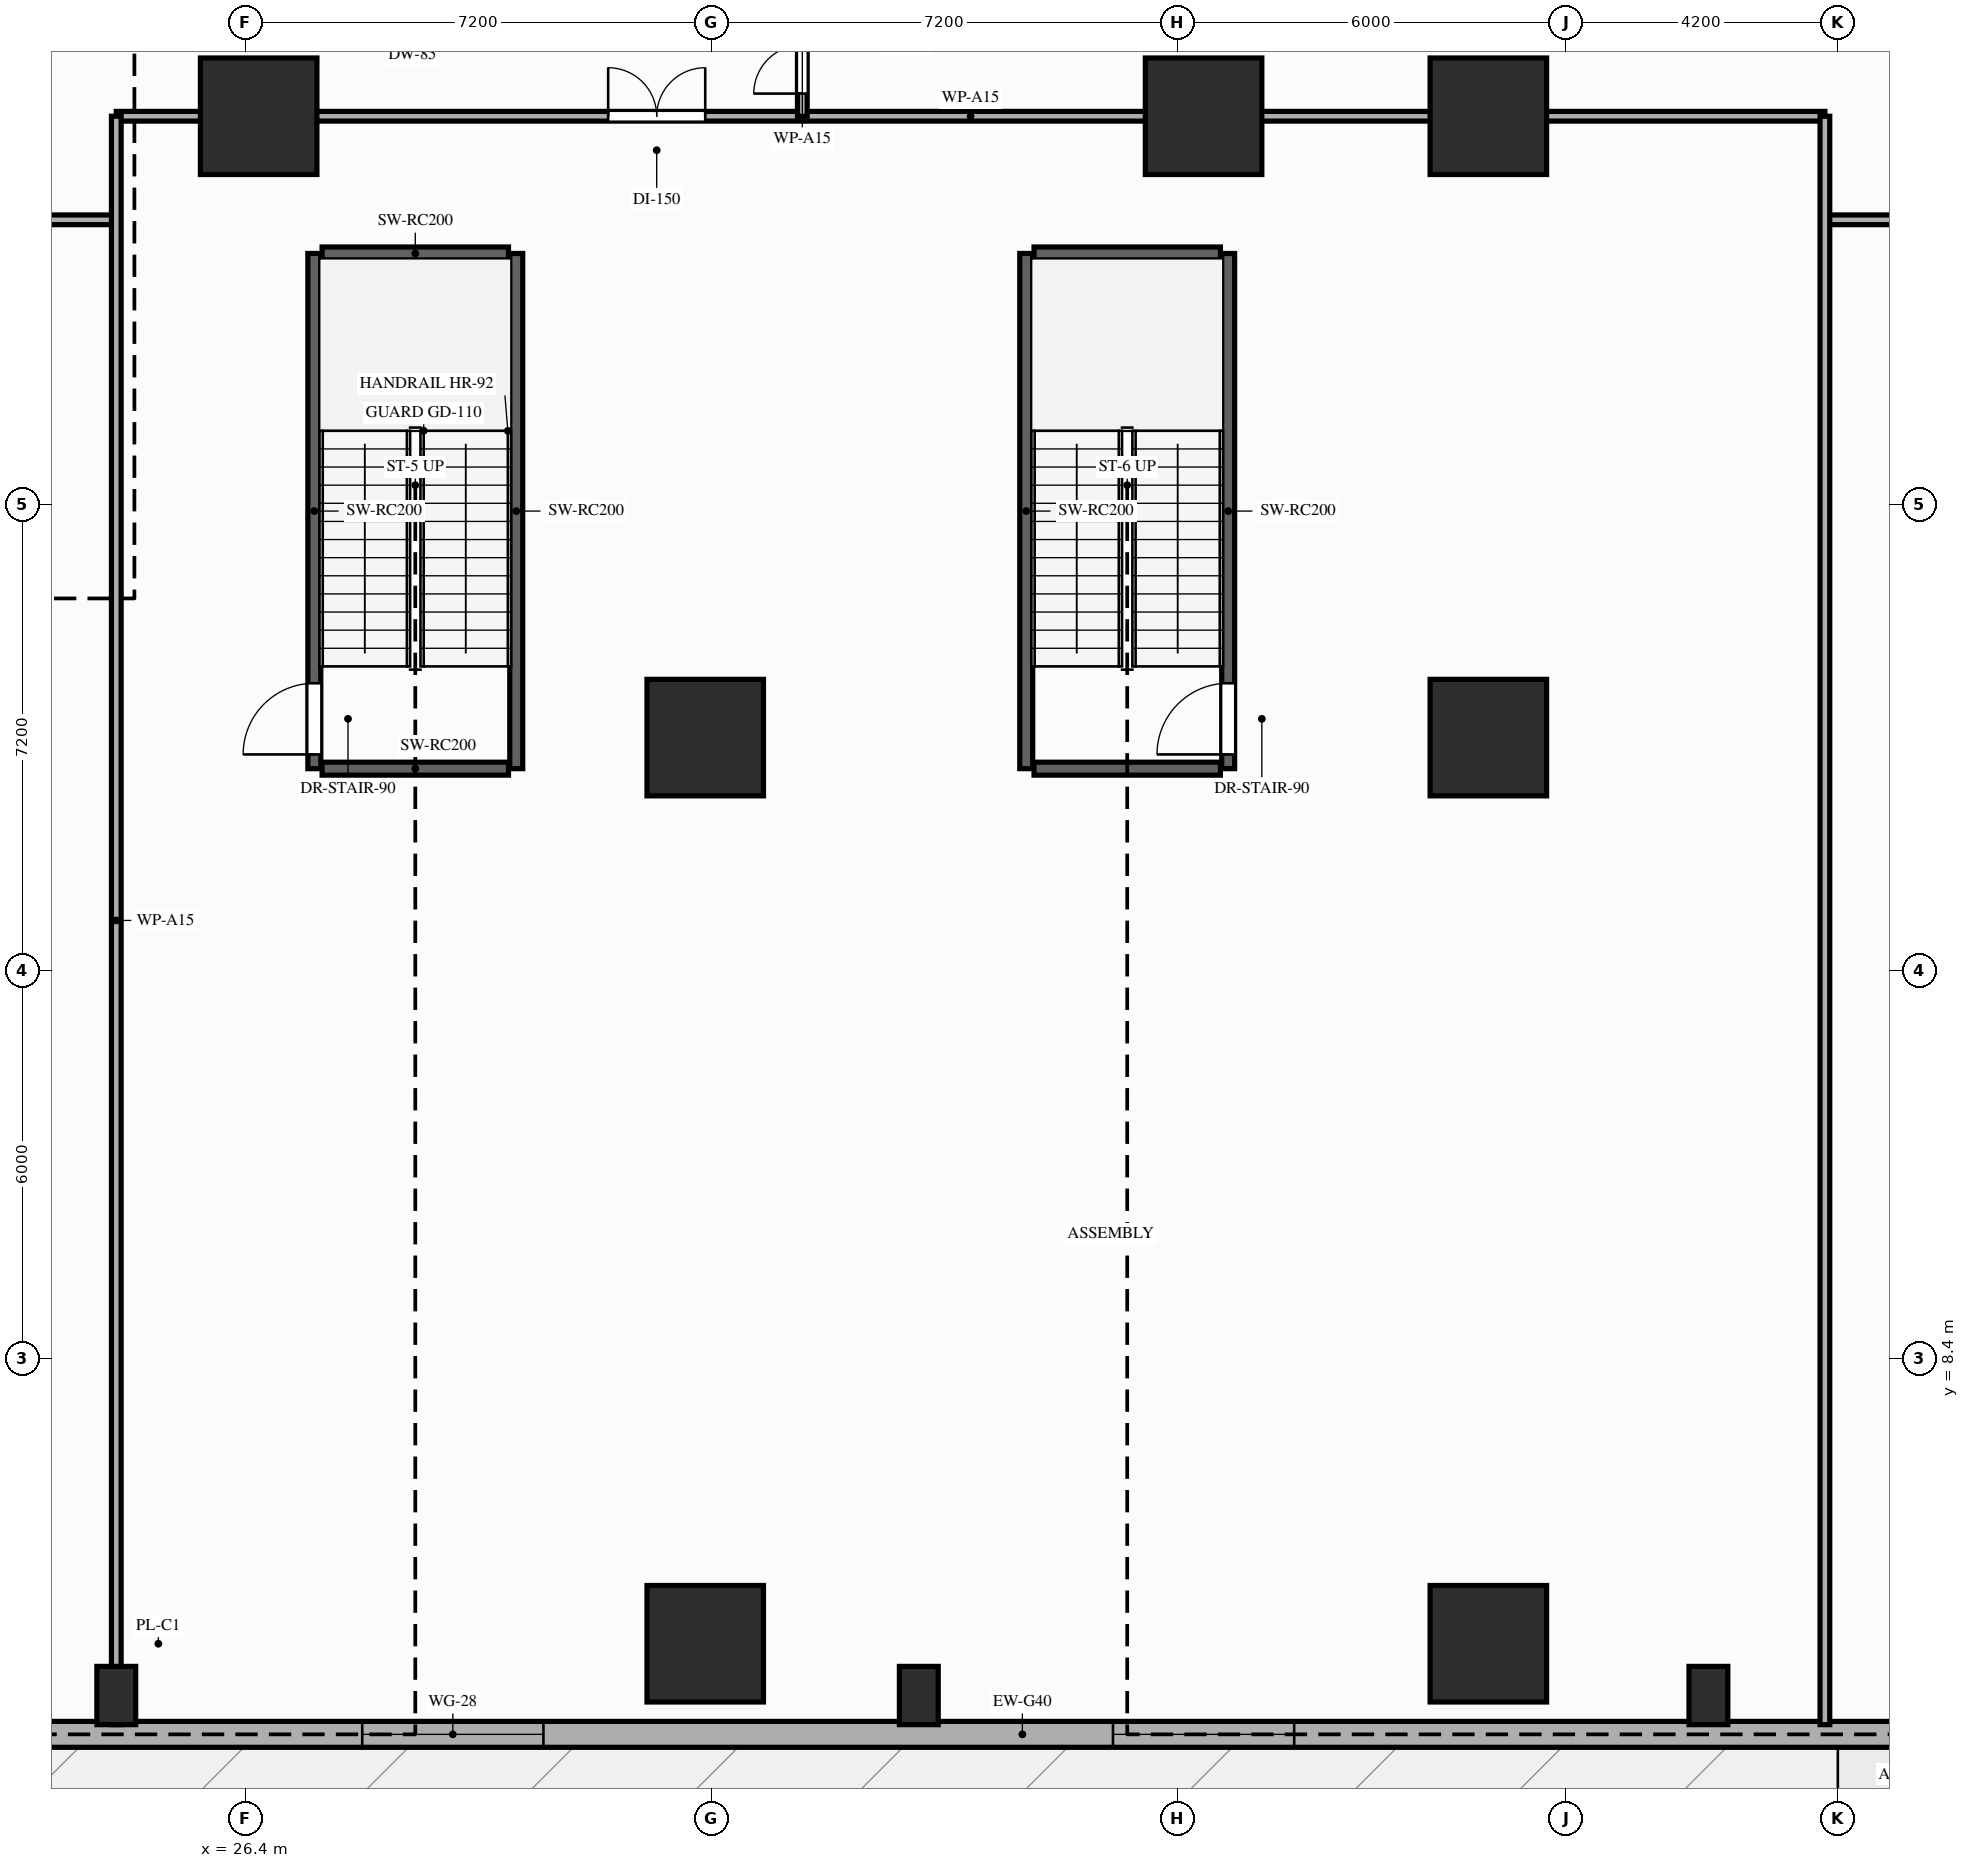
"""IFC4 building model, lengths in metres.
Left out: names, types, materials, properties, quantities, classifications, styles, units other than length and angle.
Written with IfcOpenShell. Run it as: python <this file> out.ifc"""

import sys

from ifc_helpers import new_model, si_unit, direction, frame, frame_2d, origin, origin_2d, place, context, subcontext, project, spatial, rectangle, extrude, element, fill, save


model = new_model("IFC4")
c1 = context("Model", 3, precision=1e-05, world=origin(), true_north=direction((0.0, 1.0)))
c2 = subcontext(c1, "Body", "Model", "MODEL_VIEW")
j1 = project(units=[si_unit("LENGTHUNIT", "METRE"), si_unit("PLANEANGLEUNIT", "RADIAN")], contexts=[c1])
p1 = place(None, origin())
s1 = spatial("IfcSite", under=j1, at=p1, CompositionType="ELEMENT")
p2 = place(p1, origin())
s2 = spatial("IfcBuilding", under=s1, at=p2, CompositionType="ELEMENT")
p3 = place(p2, origin())
s3 = spatial("IfcBuildingStorey", under=s2, at=p3, CompositionType="ELEMENT", Elevation=0.0)
for number, where, z_axis, x_axis in (
    (1, (26.6, 27.6, 0.0), (0.0, 0.0, 1.0), (1.0, 0.0, 0.0)),
    (2, (41.2, 27.6, 0.0), (0.0, 0.0, 1.0), (1.0, 0.0, 0.0)),
    (3, (45.6, 27.6, 0.0), (0.0, 0.0, 1.0), (1.0, 0.0, 0.0)),
    (4, (33.5, 4.0, 0.0), (0.0, 0.0, 1.0), (1.0, 0.0, 0.0)),
    (5, (45.6, 4.0, 0.0), (0.0, 0.0, 1.0), (1.0, 0.0, 0.0)),
    (6, (33.5, 18.0, 0.0), (0.0, 0.0, 1.0), (1.0, 0.0, 0.0)),
    (7, (45.6, 18.0, 0.0), (0.0, 0.0, 1.0), (1.0, 0.0, 0.0)),
):
    element("IfcColumn", number, at=place(p3, frame(where, z_axis=z_axis, x_axis=x_axis)), inside=s3, PredefinedType="COLUMN", context=c2, shape_type="SweptSolid", body=[
        extrude(rectangle(XDim=1.8, YDim=1.8, at=origin_2d()), origin(), (0.0, 0.0, 1.0), 4.6),
    ])
for number, where, z_axis, x_axis in (
    (8, (24.4, 3.2, 0.0), (0.0, 0.0, 1.0), (1.0, 0.0, 0.0)),
    (9, (36.8, 3.2, 0.0), (0.0, 0.0, 1.0), (1.0, 0.0, 0.0)),
    (10, (49.0, 3.2, 0.0), (0.0, 0.0, 1.0), (1.0, 0.0, 0.0)),
):
    element("IfcColumn", number, at=place(p3, frame(where, z_axis=z_axis, x_axis=x_axis)), inside=s3, PredefinedType="PILASTER", context=c2, shape_type="SweptSolid", body=[
        extrude(rectangle(XDim=0.6, YDim=0.9, at=origin_2d()), origin(), (0.0, 0.0, 1.0), 4.6),
    ])
p4 = place(p3, frame((3.6, 2.6, 0.0), z_axis=(0.0, 0.0, 1.0), x_axis=(1.0, 0.0, 0.0)))
e11 = element("IfcWall", 11, at=p4, inside=s3, PredefinedType="STANDARD", context=c2, shape_type="SweptSolid", body=[
    extrude(rectangle(XDim=69.6, YDim=0.4, at=frame_2d((34.8, 0.0))), origin(), (0.0, 0.0, 1.0), 4.35),
])
p5 = place(p4, frame((24.6, 0.0, 0.9)))
e12 = element("IfcOpeningElement", 12, at=p5, cuts=e11, PredefinedType="OPENING", context=c2, shape_type="SweptSolid", body=[
    extrude(rectangle(XDim=2.8, YDim=2.2, at=frame_2d((1.4, 1.1))), frame((0.0, 0.21, 0.0), z_axis=(0.0, -1.0, 0.0), x_axis=(1.0, 0.0, 0.0)), (0.0, 0.0, 1.0), 0.42),
])
p6 = place(p4, frame((36.2, 0.0, 0.9)))
e13 = element("IfcOpeningElement", 13, at=p6, cuts=e11, PredefinedType="OPENING", context=c2, shape_type="SweptSolid", body=[
    extrude(rectangle(XDim=2.8, YDim=2.2, at=frame_2d((1.4, 1.1))), frame((0.0, 0.21, 0.0), z_axis=(0.0, -1.0, 0.0), x_axis=(1.0, 0.0, 0.0)), (0.0, 0.0, 1.0), 0.42),
])
p7 = place(p4, frame((64.0, 0.0, 0.9)))
e14 = element("IfcOpeningElement", 14, at=p7, cuts=e11, PredefinedType="OPENING", context=c2, shape_type="SweptSolid", body=[
    extrude(rectangle(XDim=2.8, YDim=2.2, at=frame_2d((1.4, 1.1))), frame((0.0, 0.21, 0.0), z_axis=(0.0, -1.0, 0.0), x_axis=(1.0, 0.0, 0.0)), (0.0, 0.0, 1.0), 0.42),
])
p8 = place(p4, frame((17.2, 0.0, 0.0)))
e15 = element("IfcOpeningElement", 15, at=p8, cuts=e11, PredefinedType="OPENING", context=c2, shape_type="SweptSolid", body=[
    extrude(rectangle(XDim=2.2, YDim=2.45, at=frame_2d((1.1, 1.225))), frame((0.0, 0.21, 0.0), z_axis=(0.0, -1.0, 0.0), x_axis=(1.0, 0.0, 0.0)), (0.0, 0.0, 1.0), 0.42),
])
p9 = place(p4, frame((48.4, 0.0, 0.0)))
e16 = element("IfcOpeningElement", 16, at=p9, cuts=e11, PredefinedType="OPENING", context=c2, shape_type="SweptSolid", body=[
    extrude(rectangle(XDim=2.0, YDim=2.4, at=frame_2d((1.0, 1.2))), frame((0.0, 0.21, 0.0), z_axis=(0.0, -1.0, 0.0), x_axis=(1.0, 0.0, 0.0)), (0.0, 0.0, 1.0), 0.42),
])
p10 = place(p3, frame((27.46, 17.52, 0.0), z_axis=(0.0, 0.0, 1.0), x_axis=(0.0, 1.0, 0.0)))
e17 = element("IfcWall", 17, at=p10, inside=s3, PredefinedType="SHEAR", context=c2, shape_type="SweptSolid", body=[
    extrude(rectangle(XDim=7.96, YDim=0.2, at=frame_2d((3.98, 0.0))), origin(), (0.0, 0.0, 1.0), 4.35),
])
p11 = place(p10, frame((0.22, 0.0, 0.0)))
e18 = element("IfcOpeningElement", 18, at=p11, cuts=e17, PredefinedType="OPENING", context=c2, shape_type="SweptSolid", body=[
    extrude(rectangle(XDim=1.1, YDim=2.15, at=frame_2d((0.55, 1.075))), frame((0.0, 0.11, 0.0), z_axis=(0.0, -1.0, 0.0), x_axis=(1.0, 0.0, 0.0)), (0.0, 0.0, 1.0), 0.22),
])
p12 = place(p3, frame((30.58, 17.52, 0.0), z_axis=(0.0, 0.0, 1.0), x_axis=(0.0, 1.0, 0.0)))
e19 = element("IfcWall", 19, at=p12, inside=s3, PredefinedType="SHEAR", context=c2, shape_type="SweptSolid", body=[
    extrude(rectangle(XDim=7.96, YDim=0.2, at=frame_2d((3.98, 0.0))), origin(), (0.0, 0.0, 1.0), 4.35),
])
for number, where, z_axis, x_axis in (
    (20, (27.58, 25.48, 0.0), (0.0, 0.0, 1.0), (1.0, 0.0, 0.0)),
    (21, (27.58, 17.52, 0.0), (0.0, 0.0, 1.0), (1.0, 0.0, 0.0)),
):
    element("IfcWall", number, at=place(p3, frame(where, z_axis=z_axis, x_axis=x_axis)), inside=s3, PredefinedType="SHEAR", context=c2, shape_type="SweptSolid", body=[
        extrude(rectangle(XDim=2.88, YDim=0.2, at=frame_2d((1.44, 0.0))), origin(), (0.0, 0.0, 1.0), 4.35),
    ])
p13 = place(p3, frame((38.46, 17.52, 0.0), z_axis=(0.0, 0.0, 1.0), x_axis=(0.0, 1.0, 0.0)))
e22 = element("IfcWall", 22, at=p13, inside=s3, PredefinedType="SHEAR", context=c2, shape_type="SweptSolid", body=[
    extrude(rectangle(XDim=7.96, YDim=0.2, at=frame_2d((3.98, 0.0))), origin(), (0.0, 0.0, 1.0), 4.35),
])
p14 = place(p3, frame((41.58, 17.52, 0.0), z_axis=(0.0, 0.0, 1.0), x_axis=(0.0, 1.0, 0.0)))
e23 = element("IfcWall", 23, at=p14, inside=s3, PredefinedType="SHEAR", context=c2, shape_type="SweptSolid", body=[
    extrude(rectangle(XDim=7.96, YDim=0.2, at=frame_2d((3.98, 0.0))), origin(), (0.0, 0.0, 1.0), 4.35),
])
p15 = place(p14, frame((0.22, 0.0, 0.0)))
e24 = element("IfcOpeningElement", 24, at=p15, cuts=e23, PredefinedType="OPENING", context=c2, shape_type="SweptSolid", body=[
    extrude(rectangle(XDim=1.1, YDim=2.15, at=frame_2d((0.55, 1.075))), frame((0.0, 0.11, 0.0), z_axis=(0.0, -1.0, 0.0), x_axis=(1.0, 0.0, 0.0)), (0.0, 0.0, 1.0), 0.22),
])
for number, where, z_axis, x_axis in (
    (25, (38.58, 25.48, 0.0), (0.0, 0.0, 1.0), (1.0, 0.0, 0.0)),
    (26, (38.58, 17.52, 0.0), (0.0, 0.0, 1.0), (1.0, 0.0, 0.0)),
):
    element("IfcWall", number, at=place(p3, frame(where, z_axis=z_axis, x_axis=x_axis)), inside=s3, PredefinedType="SHEAR", context=c2, shape_type="SweptSolid", body=[
        extrude(rectangle(XDim=2.88, YDim=0.2, at=frame_2d((1.44, 0.0))), origin(), (0.0, 0.0, 1.0), 4.35),
    ])
p16 = place(p3, frame((9.75, 26.0, 0.0), z_axis=(0.0, 0.0, 1.0), x_axis=(1.0, 0.0, 0.0)))
e27 = element("IfcWall", 27, at=p16, inside=s3, PredefinedType="PARTITIONING", context=c2, shape_type="SweptSolid", body=[
    extrude(rectangle(XDim=14.65, YDim=0.15, at=frame_2d((7.325, 0.0))), origin(), (0.0, 0.0, 1.0), 3.63),
])
p17 = place(p16, frame((6.25, 0.0, 0.0)))
e28 = element("IfcOpeningElement", 28, at=p17, cuts=e27, PredefinedType="OPENING", context=c2, shape_type="SweptSolid", body=[
    extrude(rectangle(XDim=1.5, YDim=2.18, at=frame_2d((0.75, 1.09))), frame((0.0, 0.085, 0.0), z_axis=(0.0, -1.0, 0.0), x_axis=(1.0, 0.0, 0.0)), (0.0, 0.0, 1.0), 0.17),
])
p18 = place(p3, frame((24.4, 27.6, 0.0), z_axis=(0.0, 0.0, 1.0), x_axis=(1.0, 0.0, 0.0)))
e29 = element("IfcWall", 29, at=p18, inside=s3, PredefinedType="PARTITIONING", context=c2, shape_type="SweptSolid", body=[
    extrude(rectangle(XDim=26.4, YDim=0.15, at=frame_2d((13.2, 0.0))), origin(), (0.0, 0.0, 1.0), 3.63),
])
p19 = place(p18, frame((7.6, 0.0, 0.0)))
e30 = element("IfcOpeningElement", 30, at=p19, cuts=e29, PredefinedType="OPENING", context=c2, shape_type="SweptSolid", body=[
    extrude(rectangle(XDim=1.5, YDim=2.18, at=frame_2d((0.75, 1.09))), frame((0.0, 0.085, 0.0), z_axis=(0.0, -1.0, 0.0), x_axis=(1.0, 0.0, 0.0)), (0.0, 0.0, 1.0), 0.17),
])
p20 = place(p3, frame((50.8, 26.0, 0.0), z_axis=(0.0, 0.0, 1.0), x_axis=(1.0, 0.0, 0.0)))
e31 = element("IfcWall", 31, at=p20, inside=s3, PredefinedType="PARTITIONING", context=c2, shape_type="SweptSolid", body=[
    extrude(rectangle(XDim=11.6, YDim=0.15, at=frame_2d((5.8, 0.0))), origin(), (0.0, 0.0, 1.0), 3.63),
])
p21 = place(p20, frame((3.7, 0.0, 0.0)))
e32 = element("IfcOpeningElement", 32, at=p21, cuts=e31, PredefinedType="OPENING", context=c2, shape_type="SweptSolid", body=[
    extrude(rectangle(XDim=1.5, YDim=2.18, at=frame_2d((0.75, 1.09))), frame((0.0, 0.085, 0.0), z_axis=(0.0, -1.0, 0.0), x_axis=(1.0, 0.0, 0.0)), (0.0, 0.0, 1.0), 0.17),
])
p22 = place(p3, frame((35.0, 27.6, 0.0), z_axis=(0.0, 0.0, 1.0), x_axis=(0.0, 1.0, 0.0)))
e33 = element("IfcWall", 33, at=p22, inside=s3, PredefinedType="PARTITIONING", context=c2, shape_type="SweptSolid", body=[
    extrude(rectangle(XDim=2.2, YDim=0.15, at=frame_2d((1.1, 0.0))), origin(), (0.0, 0.0, 1.0), 3.63),
])
p23 = place(p22, frame((0.35, 0.0, 0.0)))
e34 = element("IfcOpeningElement", 34, at=p23, cuts=e33, PredefinedType="OPENING", context=c2, shape_type="SweptSolid", body=[
    extrude(rectangle(XDim=1.5, YDim=2.18, at=frame_2d((0.75, 1.09))), frame((0.0, 0.085, 0.0), z_axis=(0.0, -1.0, 0.0), x_axis=(1.0, 0.0, 0.0)), (0.0, 0.0, 1.0), 0.17),
])
for number, where, z_axis, x_axis in (
    (35, (24.4, 2.75, 0.0), (0.0, 0.0, 1.0), (0.0, 1.0, 0.0)),
    (36, (50.8, 2.75, 0.0), (0.0, 0.0, 1.0), (0.0, 1.0, 0.0)),
):
    element("IfcWall", number, at=place(p3, frame(where, z_axis=z_axis, x_axis=x_axis)), inside=s3, PredefinedType="PARTITIONING", context=c2, shape_type="SweptSolid", body=[
        extrude(rectangle(XDim=24.85, YDim=0.15, at=frame_2d((12.425, 0.0))), origin(), (0.0, 0.0, 1.0), 3.43),
    ])
p24 = place(p5, origin())
e37 = element("IfcWindow", 37, at=p24, inside=s3, PartitioningType="SINGLE_PANEL", PredefinedType="WINDOW", context=c2, shape_type="SweptSolid", body=[
    extrude(rectangle(XDim=2.8, YDim=2.2, at=frame_2d((1.4, 1.1))), frame((0.0, 0.03, 0.0), z_axis=(0.0, -1.0, 0.0), x_axis=(1.0, 0.0, 0.0)), (0.0, 0.0, 1.0), 0.06),
])
fill(e12, e37)
p25 = place(p6, origin())
e38 = element("IfcWindow", 38, at=p25, inside=s3, PartitioningType="SINGLE_PANEL", PredefinedType="WINDOW", context=c2, shape_type="SweptSolid", body=[
    extrude(rectangle(XDim=2.8, YDim=2.2, at=frame_2d((1.4, 1.1))), frame((0.0, 0.03, 0.0), z_axis=(0.0, -1.0, 0.0), x_axis=(1.0, 0.0, 0.0)), (0.0, 0.0, 1.0), 0.06),
])
fill(e13, e38)
p26 = place(p11, origin())
e39 = element("IfcDoor", 39, at=p26, inside=s3, OperationType="SINGLE_SWING_LEFT", PredefinedType="DOOR", context=c2, shape_type="SweptSolid", body=[
    extrude(rectangle(XDim=1.1, YDim=2.15, at=frame_2d((0.55, 1.075))), frame((0.0, 0.025, 0.0), z_axis=(0.0, -1.0, 0.0), x_axis=(1.0, 0.0, 0.0)), (0.0, 0.0, 1.0), 0.05),
])
fill(e18, e39)
p27 = place(p15, origin())
e40 = element("IfcDoor", 40, at=p27, inside=s3, OperationType="SINGLE_SWING_LEFT", PredefinedType="DOOR", context=c2, shape_type="SweptSolid", body=[
    extrude(rectangle(XDim=1.1, YDim=2.15, at=frame_2d((0.55, 1.075))), frame((0.0, 0.025, 0.0), z_axis=(0.0, -1.0, 0.0), x_axis=(1.0, 0.0, 0.0)), (0.0, 0.0, 1.0), 0.05),
])
fill(e24, e40)
p28 = place(p23, origin())
e41 = element("IfcDoor", 41, at=p28, inside=s3, OperationType="DOUBLE_DOOR_SINGLE_SWING", PredefinedType="DOOR", context=c2, shape_type="SweptSolid", body=[
    extrude(rectangle(XDim=1.5, YDim=2.18, at=frame_2d((0.75, 1.09))), frame((0.0, 0.025, 0.0), z_axis=(0.0, -1.0, 0.0), x_axis=(1.0, 0.0, 0.0)), (0.0, 0.0, 1.0), 0.05),
])
fill(e34, e41)
p29 = place(p19, origin())
e42 = element("IfcDoor", 42, at=p29, inside=s3, OperationType="DOUBLE_DOOR_SINGLE_SWING", PredefinedType="DOOR", context=c2, shape_type="SweptSolid", body=[
    extrude(rectangle(XDim=1.5, YDim=2.18, at=frame_2d((0.75, 1.09))), frame((0.0, 0.025, 0.0), z_axis=(0.0, -1.0, 0.0), x_axis=(1.0, 0.0, 0.0)), (0.0, 0.0, 1.0), 0.05),
])
fill(e30, e42)
save(model, sys.argv[1])
